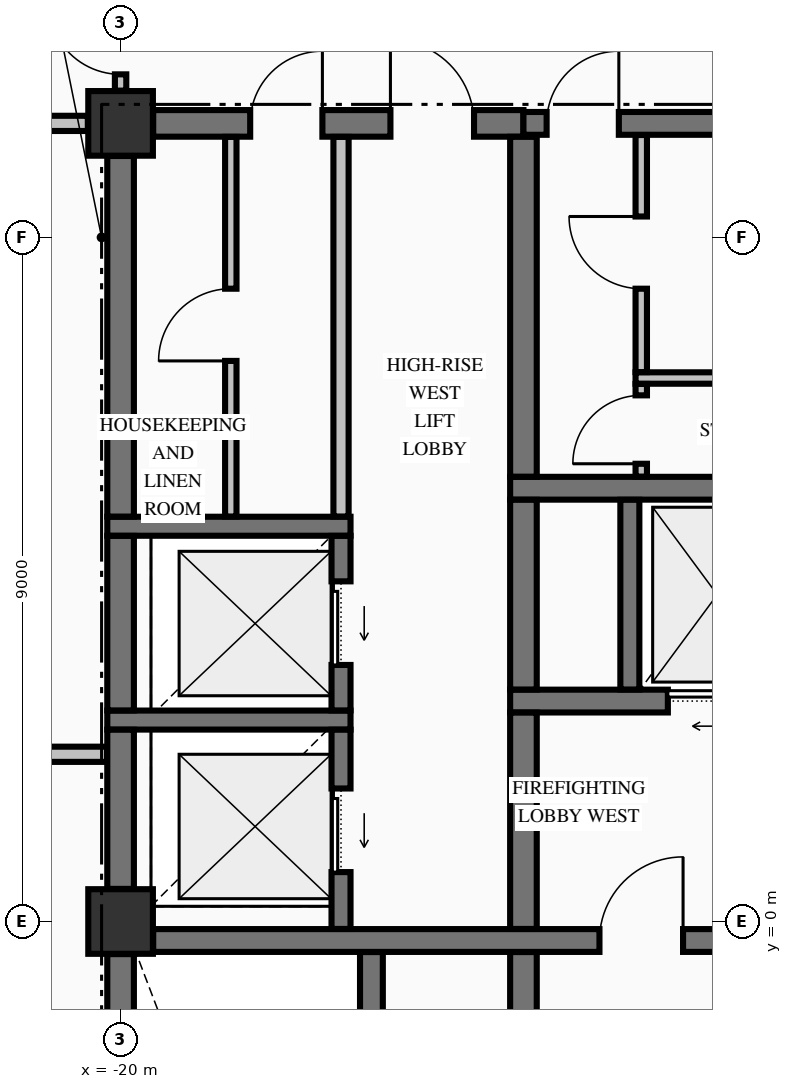
"""IFC4 building model, lengths in metres.
Left out: names, types, materials, properties, quantities, classifications, styles, units other than length and angle.
Written with IfcOpenShell. Run it as: python <this file> out.ifc"""

import sys

from ifc_helpers import new_model, si_unit, direction, frame, frame_2d, origin, origin_2d, place, context, subcontext, project, spatial, rectangle, extrude, element, fill, save


model = new_model("IFC4")
c1 = context("Model", 3, precision=1e-05, world=origin(), true_north=direction((0.0, 1.0)))
c2 = subcontext(c1, "Body", "Model", "MODEL_VIEW")
j1 = project(units=[si_unit("LENGTHUNIT", "METRE"), si_unit("PLANEANGLEUNIT", "RADIAN")], contexts=[c1])
p1 = place(None, origin())
s1 = spatial("IfcSite", under=j1, at=p1, CompositionType="ELEMENT")
p2 = place(p1, origin())
s2 = spatial("IfcBuilding", under=s1, at=p2, CompositionType="ELEMENT")
p3 = place(p2, frame((0.0, 0.0, 205.06)))
s3 = spatial("IfcBuildingStorey", under=s2, at=p3, CompositionType="ELEMENT", Elevation=205.06)
for number, where, z_axis, x_axis in (
    (1, (-20.0, 10.5, -0.25), (0.0, 0.0, 1.0), (1.0, 0.0, 0.0)),
    (2, (-20.0, 0.0, -0.25), (0.0, 0.0, 1.0), (1.0, 0.0, 0.0)),
):
    element("IfcColumn", number, at=place(p3, frame(where, z_axis=z_axis, x_axis=x_axis)), inside=s3, PredefinedType="COLUMN", context=c2, shape_type="SweptSolid", body=[
        extrude(rectangle(XDim=0.85, YDim=0.85, at=origin_2d()), origin(), (0.0, 0.0, 1.0), 3.4),
    ])
p4 = place(p3, frame((-19.571, -0.25, 0.0), z_axis=(0.0, 0.0, 1.0), x_axis=(1.0, 0.0, 0.0)))
e3 = element("IfcWall", 3, at=p4, inside=s3, PredefinedType="SHEAR", context=c2, shape_type="SweptSolid", body=[
    extrude(rectangle(XDim=8.142, YDim=0.3, at=frame_2d((4.071, 0.0))), origin(), (0.0, 0.0, 1.0), 3.15),
])
p5 = place(p4, frame((5.871, 0.0, 0.0)))
e4 = element("IfcOpeningElement", 4, at=p5, cuts=e3, PredefinedType="OPENING", context=c2, shape_type="SweptSolid", body=[
    extrude(rectangle(XDim=1.1, YDim=2.15, at=frame_2d((0.55, 1.075))), frame((0.0, 0.16, 0.0), z_axis=(0.0, -1.0, 0.0), x_axis=(1.0, 0.0, 0.0)), (0.0, 0.0, 1.0), 0.32),
])
p6 = place(p3, frame((-20.175, 2.65, 0.0), z_axis=(0.0, 0.0, 1.0), x_axis=(1.0, 0.0, 0.0)))
e5 = element("IfcWall", 5, at=p6, inside=s3, PredefinedType="SOLIDWALL", context=c2, shape_type="SweptSolid", body=[
    extrude(rectangle(XDim=3.2, YDim=0.25, at=frame_2d((1.6, 0.0))), origin(), (0.0, 0.0, 1.0), 3.15),
])
p7 = place(p3, frame((-14.875, 2.9, 0.0), z_axis=(0.0, 0.0, 1.0), x_axis=(1.0, 0.0, 0.0)))
e6 = element("IfcWall", 6, at=p7, inside=s3, PredefinedType="SHEAR", context=c2, shape_type="SweptSolid", body=[
    extrude(rectangle(XDim=4.025, YDim=0.3, at=frame_2d((2.012, 0.0))), origin(), (0.0, 0.0, 1.0), 3.15),
])
p8 = place(p7, frame((2.075, 0.0, 0.0)))
e7 = element("IfcOpeningElement", 7, at=p8, cuts=e6, PredefinedType="OPENING", context=c2, shape_type="SweptSolid", body=[
    extrude(rectangle(XDim=1.1, YDim=2.2, at=frame_2d((0.55, 1.1))), frame((0.0, 0.16, 0.0), z_axis=(0.0, -1.0, 0.0), x_axis=(1.0, 0.0, 0.0)), (0.0, 0.0, 1.0), 0.32),
])
p9 = place(p3, frame((-20.175, 5.2, 0.0), z_axis=(0.0, 0.0, 1.0), x_axis=(1.0, 0.0, 0.0)))
e8 = element("IfcWall", 8, at=p9, inside=s3, PredefinedType="SOLIDWALL", context=c2, shape_type="SweptSolid", body=[
    extrude(rectangle(XDim=3.2, YDim=0.25, at=frame_2d((1.6, 0.0))), origin(), (0.0, 0.0, 1.0), 3.15),
])
p10 = place(p3, frame((-14.875, 5.7, 0.0), z_axis=(0.0, 0.0, 1.0), x_axis=(1.0, 0.0, 0.0)))
e9 = element("IfcWall", 9, at=p10, inside=s3, PredefinedType="SHEAR", context=c2, shape_type="SweptSolid", body=[
    extrude(rectangle(XDim=4.025, YDim=0.3, at=frame_2d((2.012, 0.0))), origin(), (0.0, 0.0, 1.0), 3.15),
])
p11 = place(p3, frame((-19.571, 10.5, 0.0), z_axis=(0.0, 0.0, 1.0), x_axis=(1.0, 0.0, 0.0)))
e10 = element("IfcWall", 10, at=p11, inside=s3, PredefinedType="SHEAR", context=c2, shape_type="SweptSolid", body=[
    extrude(rectangle(XDim=4.871, YDim=0.35, at=frame_2d((2.436, 0.0))), origin(), (0.0, 0.0, 1.0), 3.15),
])
p12 = place(p11, frame((3.121, 0.0, 0.0)))
e11 = element("IfcOpeningElement", 11, at=p12, cuts=e10, PredefinedType="OPENING", context=c2, shape_type="SweptSolid", body=[
    extrude(rectangle(XDim=1.1, YDim=2.15, at=frame_2d((0.55, 1.075))), frame((0.0, 0.185, 0.0), z_axis=(0.0, -1.0, 0.0), x_axis=(1.0, 0.0, 0.0)), (0.0, 0.0, 1.0), 0.37),
])
p13 = place(p11, frame((1.276, 0.0, 0.0)))
e12 = element("IfcOpeningElement", 12, at=p13, cuts=e10, PredefinedType="OPENING", context=c2, shape_type="SweptSolid", body=[
    extrude(rectangle(XDim=0.95, YDim=2.15, at=frame_2d((0.475, 1.075))), frame((0.0, 0.185, 0.0), z_axis=(0.0, -1.0, 0.0), x_axis=(1.0, 0.0, 0.0)), (0.0, 0.0, 1.0), 0.37),
])
p14 = place(p3, frame((-14.7, 10.5, 0.0), z_axis=(0.0, 0.0, 1.0), x_axis=(1.0, 0.0, 0.0)))
e13 = element("IfcWall", 13, at=p14, inside=s3, PredefinedType="SHEAR", context=c2, shape_type="SweptSolid", body=[
    extrude(rectangle(XDim=3.271, YDim=0.3, at=frame_2d((1.635, 0.0))), origin(), (0.0, 0.0, 1.0), 3.15),
])
p15 = place(p14, frame((0.305, 0.0, 0.0)))
e14 = element("IfcOpeningElement", 14, at=p15, cuts=e13, PredefinedType="OPENING", context=c2, shape_type="SweptSolid", body=[
    extrude(rectangle(XDim=0.95, YDim=2.15, at=frame_2d((0.475, 1.075))), frame((0.0, 0.16, 0.0), z_axis=(0.0, -1.0, 0.0), x_axis=(1.0, 0.0, 0.0)), (0.0, 0.0, 1.0), 0.32),
])
p16 = place(p3, frame((-26.835, 2.2, 0.0), z_axis=(0.0, 0.0, 1.0), x_axis=(1.0, 0.0, 0.0)))
e15 = element("IfcWall", 15, at=p16, inside=s3, PredefinedType="PARTITIONING", context=c2, shape_type="SweptSolid", body=[
    extrude(rectangle(XDim=6.657, YDim=0.2, at=frame_2d((3.329, 0.0))), origin(), (0.0, 0.0, 1.0), 3.15),
])
p17 = place(p3, frame((-13.225, 7.15, 0.0), z_axis=(0.0, 0.0, 1.0), x_axis=(1.0, 0.0, 0.0)))
e16 = element("IfcWall", 16, at=p17, inside=s3, PredefinedType="PARTITIONING", context=c2, shape_type="SweptSolid", body=[
    extrude(rectangle(XDim=2.072, YDim=0.15, at=frame_2d((1.036, 0.0))), origin(), (0.0, 0.0, 1.0), 3.15),
])
p18 = place(p3, frame((-26.835, 10.5, 0.0), z_axis=(0.0, 0.0, 1.0), x_axis=(1.0, 0.0, 0.0)))
e17 = element("IfcWall", 17, at=p18, inside=s3, PredefinedType="PARTITIONING", context=c2, shape_type="SweptSolid", body=[
    extrude(rectangle(XDim=6.404, YDim=0.2, at=frame_2d((3.202, 0.0))), origin(), (0.0, 0.0, 1.0), 3.15),
])
p19 = place(p18, frame((2.86, 0.0, 0.0)))
e18 = element("IfcOpeningElement", 18, at=p19, cuts=e17, PredefinedType="OPENING", context=c2, shape_type="SweptSolid", body=[
    extrude(rectangle(XDim=0.95, YDim=2.15, at=frame_2d((0.475, 1.075))), frame((0.0, 0.11, 0.0), z_axis=(0.0, -1.0, 0.0), x_axis=(1.0, 0.0, 0.0)), (0.0, 0.0, 1.0), 0.22),
])
p20 = place(p3, frame((-20.0, -9.521, 0.0), z_axis=(0.0, 0.0, 1.0), x_axis=(0.0, 1.0, 0.0)))
e19 = element("IfcWall", 19, at=p20, inside=s3, PredefinedType="SHEAR", context=c2, shape_type="SweptSolid", body=[
    extrude(rectangle(XDim=9.092, YDim=0.35, at=frame_2d((4.546, 0.0))), origin(), (0.0, 0.0, 1.0), 3.15),
])
p21 = place(p3, frame((-20.0, 0.429, 0.0), z_axis=(0.0, 0.0, 1.0), x_axis=(0.0, 1.0, 0.0)))
e20 = element("IfcWall", 20, at=p21, inside=s3, PredefinedType="SHEAR", context=c2, shape_type="SweptSolid", body=[
    extrude(rectangle(XDim=2.094, YDim=0.35, at=frame_2d((1.047, 0.0))), origin(), (0.0, 0.0, 1.0), 3.15),
])
p22 = place(p3, frame((-20.0, 2.777, 0.0), z_axis=(0.0, 0.0, 1.0), x_axis=(0.0, 1.0, 0.0)))
e21 = element("IfcWall", 21, at=p22, inside=s3, PredefinedType="SHEAR", context=c2, shape_type="SweptSolid", body=[
    extrude(rectangle(XDim=2.296, YDim=0.35, at=frame_2d((1.148, 0.0))), origin(), (0.0, 0.0, 1.0), 3.15),
])
p23 = place(p3, frame((-20.0, 5.327, 0.0), z_axis=(0.0, 0.0, 1.0), x_axis=(0.0, 1.0, 0.0)))
e22 = element("IfcWall", 22, at=p23, inside=s3, PredefinedType="SHEAR", context=c2, shape_type="SweptSolid", body=[
    extrude(rectangle(XDim=4.744, YDim=0.35, at=frame_2d((2.372, 0.0))), origin(), (0.0, 0.0, 1.0), 3.15),
])
p24 = place(p3, frame((-17.1, -0.098, 0.0), z_axis=(0.0, 0.0, 1.0), x_axis=(0.0, 1.0, 0.0)))
e23 = element("IfcWall", 23, at=p24, inside=s3, PredefinedType="SOLIDWALL", context=c2, shape_type="SweptSolid", body=[
    extrude(rectangle(XDim=2.621, YDim=0.25, at=frame_2d((1.311, 0.0))), origin(), (0.0, 0.0, 1.0), 3.15),
])
p25 = place(p24, frame((0.748, 0.0, 0.0)))
e24 = element("IfcOpeningElement", 24, at=p25, cuts=e23, PredefinedType="OPENING", context=c2, shape_type="SweptSolid", body=[
    extrude(rectangle(XDim=1.1, YDim=2.2, at=frame_2d((0.55, 1.1))), frame((0.0, 0.135, 0.0), z_axis=(0.0, -1.0, 0.0), x_axis=(1.0, 0.0, 0.0)), (0.0, 0.0, 1.0), 0.27),
])
p26 = place(p3, frame((-17.1, 2.777, 0.0), z_axis=(0.0, 0.0, 1.0), x_axis=(0.0, 1.0, 0.0)))
e25 = element("IfcWall", 25, at=p26, inside=s3, PredefinedType="SOLIDWALL", context=c2, shape_type="SweptSolid", body=[
    extrude(rectangle(XDim=2.296, YDim=0.25, at=frame_2d((1.148, 0.0))), origin(), (0.0, 0.0, 1.0), 3.15),
])
p27 = place(p26, frame((0.598, 0.0, 0.0)))
e26 = element("IfcOpeningElement", 26, at=p27, cuts=e25, PredefinedType="OPENING", context=c2, shape_type="SweptSolid", body=[
    extrude(rectangle(XDim=1.1, YDim=2.2, at=frame_2d((0.55, 1.1))), frame((0.0, 0.135, 0.0), z_axis=(0.0, -1.0, 0.0), x_axis=(1.0, 0.0, 0.0)), (0.0, 0.0, 1.0), 0.27),
])
p28 = place(p3, frame((-16.7, -9.773, 0.0), z_axis=(0.0, 0.0, 1.0), x_axis=(0.0, 1.0, 0.0)))
e27 = element("IfcWall", 27, at=p28, inside=s3, PredefinedType="SHEAR", context=c2, shape_type="SweptSolid", body=[
    extrude(rectangle(XDim=9.371, YDim=0.3, at=frame_2d((4.686, 0.0))), origin(), (0.0, 0.0, 1.0), 3.15),
])
p29 = place(p3, frame((-14.7, -9.773, 0.0), z_axis=(0.0, 0.0, 1.0), x_axis=(0.0, 1.0, 0.0)))
e28 = element("IfcWall", 28, at=p29, inside=s3, PredefinedType="SHEAR", context=c2, shape_type="SweptSolid", body=[
    extrude(rectangle(XDim=9.371, YDim=0.35, at=frame_2d((4.686, 0.0))), origin(), (0.0, 0.0, 1.0), 3.15),
])
p30 = place(p3, frame((-14.7, -0.098, 0.0), z_axis=(0.0, 0.0, 1.0), x_axis=(0.0, 1.0, 0.0)))
e29 = element("IfcWall", 29, at=p30, inside=s3, PredefinedType="SHEAR", context=c2, shape_type="SweptSolid", body=[
    extrude(rectangle(XDim=2.846, YDim=0.35, at=frame_2d((1.423, 0.0))), origin(), (0.0, 0.0, 1.0), 3.15),
])
p31 = place(p3, frame((-14.7, 3.052, 0.0), z_axis=(0.0, 0.0, 1.0), x_axis=(0.0, 1.0, 0.0)))
e30 = element("IfcWall", 30, at=p31, inside=s3, PredefinedType="SHEAR", context=c2, shape_type="SweptSolid", body=[
    extrude(rectangle(XDim=2.496, YDim=0.35, at=frame_2d((1.248, 0.0))), origin(), (0.0, 0.0, 1.0), 3.15),
])
p32 = place(p3, frame((-14.7, 5.852, 0.0), z_axis=(0.0, 0.0, 1.0), x_axis=(0.0, 1.0, 0.0)))
e31 = element("IfcWall", 31, at=p32, inside=s3, PredefinedType="SHEAR", context=c2, shape_type="SweptSolid", body=[
    extrude(rectangle(XDim=4.471, YDim=0.35, at=frame_2d((2.235, 0.0))), origin(), (0.0, 0.0, 1.0), 3.15),
])
p33 = place(p3, frame((-13.3, 3.052, 0.0), z_axis=(0.0, 0.0, 1.0), x_axis=(0.0, 1.0, 0.0)))
e32 = element("IfcWall", 32, at=p33, inside=s3, PredefinedType="SOLIDWALL", context=c2, shape_type="SweptSolid", body=[
    extrude(rectangle(XDim=2.496, YDim=0.25, at=frame_2d((1.248, 0.0))), origin(), (0.0, 0.0, 1.0), 3.15),
])
p34 = place(p3, frame((-20.0, 10.931, 0.0), z_axis=(0.0, 0.0, 1.0), x_axis=(0.0, 1.0, 0.0)))
e33 = element("IfcWall", 33, at=p34, inside=s3, PredefinedType="PARTITIONING", context=c2, shape_type="SweptSolid", body=[
    extrude(rectangle(XDim=1.716, YDim=0.15, at=frame_2d((0.858, 0.0))), origin(), (0.0, 0.0, 1.0), 2.342),
])
p35 = place(p34, frame((0.214, 0.0, 0.0)))
e34 = element("IfcOpeningElement", 34, at=p35, cuts=e33, PredefinedType="OPENING", context=c2, shape_type="SweptSolid", body=[
    extrude(rectangle(XDim=0.95, YDim=2.15, at=frame_2d((0.475, 1.075))), frame((0.0, 0.085, 0.0), z_axis=(0.0, -1.0, 0.0), x_axis=(1.0, 0.0, 0.0)), (0.0, 0.0, 1.0), 0.17),
])
p36 = place(p3, frame((-18.55, 5.328, 0.0), z_axis=(0.0, 0.0, 1.0), x_axis=(0.0, 1.0, 0.0)))
e35 = element("IfcWall", 35, at=p36, inside=s3, PredefinedType="PARTITIONING", context=c2, shape_type="SweptSolid", body=[
    extrude(rectangle(XDim=4.994, YDim=0.15, at=frame_2d((2.497, 0.0))), origin(), (0.0, 0.0, 1.0), 3.15),
])
p37 = place(p36, frame((2.047, 0.0, 0.0)))
e36 = element("IfcOpeningElement", 36, at=p37, cuts=e35, PredefinedType="OPENING", context=c2, shape_type="SweptSolid", body=[
    extrude(rectangle(XDim=0.95, YDim=2.15, at=frame_2d((0.475, 1.075))), frame((0.0, 0.085, 0.0), z_axis=(0.0, -1.0, 0.0), x_axis=(1.0, 0.0, 0.0)), (0.0, 0.0, 1.0), 0.17),
])
p38 = place(p3, frame((-17.1, 5.328, 0.0), z_axis=(0.0, 0.0, 1.0), x_axis=(0.0, 1.0, 0.0)))
e37 = element("IfcWall", 37, at=p38, inside=s3, PredefinedType="PARTITIONING", context=c2, shape_type="SweptSolid", body=[
    extrude(rectangle(XDim=4.994, YDim=0.2, at=frame_2d((2.497, 0.0))), origin(), (0.0, 0.0, 1.0), 3.15),
])
p39 = place(p3, frame((-13.15, 5.853, 0.0), z_axis=(0.0, 0.0, 1.0), x_axis=(0.0, 1.0, 0.0)))
e38 = element("IfcWall", 38, at=p39, inside=s3, PredefinedType="PARTITIONING", context=c2, shape_type="SweptSolid", body=[
    extrude(rectangle(XDim=1.219, YDim=0.15, at=frame_2d((0.609, 0.0))), origin(), (0.0, 0.0, 1.0), 3.15),
])
p40 = place(p39, frame((0.169, 0.0, 0.0)))
e39 = element("IfcOpeningElement", 39, at=p40, cuts=e38, PredefinedType="OPENING", context=c2, shape_type="SweptSolid", body=[
    extrude(rectangle(XDim=0.9, YDim=2.15, at=frame_2d((0.45, 1.075))), frame((0.0, 0.085, 0.0), z_axis=(0.0, -1.0, 0.0), x_axis=(1.0, 0.0, 0.0)), (0.0, 0.0, 1.0), 0.17),
])
p41 = place(p3, frame((-13.15, 7.228, 0.0), z_axis=(0.0, 0.0, 1.0), x_axis=(0.0, 1.0, 0.0)))
e40 = element("IfcWall", 40, at=p41, inside=s3, PredefinedType="PARTITIONING", context=c2, shape_type="SweptSolid", body=[
    extrude(rectangle(XDim=3.119, YDim=0.15, at=frame_2d((1.56, 0.0))), origin(), (0.0, 0.0, 1.0), 3.15),
])
p42 = place(p41, frame((1.097, 0.0, 0.0)))
e41 = element("IfcOpeningElement", 41, at=p42, cuts=e40, PredefinedType="OPENING", context=c2, shape_type="SweptSolid", body=[
    extrude(rectangle(XDim=0.95, YDim=2.15, at=frame_2d((0.475, 1.075))), frame((0.0, 0.085, 0.0), z_axis=(0.0, -1.0, 0.0), x_axis=(1.0, 0.0, 0.0)), (0.0, 0.0, 1.0), 0.17),
])
p43 = place(p5, origin())
e42 = element("IfcDoor", 42, at=p43, inside=s3, OperationType="SINGLE_SWING_RIGHT", PredefinedType="DOOR", context=c2, shape_type="SweptSolid", body=[
    extrude(rectangle(XDim=1.1, YDim=2.15, at=frame_2d((0.55, 1.075))), frame((0.0, 0.025, 0.0), z_axis=(0.0, -1.0, 0.0), x_axis=(1.0, 0.0, 0.0)), (0.0, 0.0, 1.0), 0.05),
])
fill(e4, e42)
p44 = place(p8, origin())
e43 = element("IfcDoor", 43, at=p44, inside=s3, OperationType="SLIDING_TO_LEFT", PredefinedType="DOOR", context=c2, shape_type="SweptSolid", body=[
    extrude(rectangle(XDim=1.1, YDim=2.2, at=frame_2d((0.55, 1.1))), frame((0.0, 0.025, 0.0), z_axis=(0.0, -1.0, 0.0), x_axis=(1.0, 0.0, 0.0)), (0.0, 0.0, 1.0), 0.05),
])
fill(e7, e43)
p45 = place(p15, origin())
e44 = element("IfcDoor", 44, at=p45, inside=s3, OperationType="SINGLE_SWING_RIGHT", PredefinedType="DOOR", context=c2, shape_type="SweptSolid", body=[
    extrude(rectangle(XDim=0.95, YDim=2.15, at=frame_2d((0.475, 1.075))), frame((0.0, 0.025, 0.0), z_axis=(0.0, -1.0, 0.0), x_axis=(1.0, 0.0, 0.0)), (0.0, 0.0, 1.0), 0.05),
])
fill(e14, e44)
p46 = place(p40, origin())
e45 = element("IfcDoor", 45, at=p46, inside=s3, OperationType="SINGLE_SWING_LEFT", PredefinedType="DOOR", context=c2, shape_type="SweptSolid", body=[
    extrude(rectangle(XDim=0.9, YDim=2.15, at=frame_2d((0.45, 1.075))), frame((0.0, 0.025, 0.0), z_axis=(0.0, -1.0, 0.0), x_axis=(1.0, 0.0, 0.0)), (0.0, 0.0, 1.0), 0.05),
])
fill(e39, e45)
p47 = place(p42, origin())
e46 = element("IfcDoor", 46, at=p47, inside=s3, OperationType="SINGLE_SWING_RIGHT", PredefinedType="DOOR", context=c2, shape_type="SweptSolid", body=[
    extrude(rectangle(XDim=0.95, YDim=2.15, at=frame_2d((0.475, 1.075))), frame((0.0, 0.025, 0.0), z_axis=(0.0, -1.0, 0.0), x_axis=(1.0, 0.0, 0.0)), (0.0, 0.0, 1.0), 0.05),
])
fill(e41, e46)
p48 = place(p25, origin())
e47 = element("IfcDoor", 47, at=p48, inside=s3, OperationType="SLIDING_TO_LEFT", PredefinedType="DOOR", context=c2, shape_type="SweptSolid", body=[
    extrude(rectangle(XDim=1.1, YDim=2.2, at=frame_2d((0.55, 1.1))), frame((0.0, 0.025, 0.0), z_axis=(0.0, -1.0, 0.0), x_axis=(1.0, 0.0, 0.0)), (0.0, 0.0, 1.0), 0.05),
])
fill(e24, e47)
p49 = place(p27, origin())
e48 = element("IfcDoor", 48, at=p49, inside=s3, OperationType="SLIDING_TO_LEFT", PredefinedType="DOOR", context=c2, shape_type="SweptSolid", body=[
    extrude(rectangle(XDim=1.1, YDim=2.2, at=frame_2d((0.55, 1.1))), frame((0.0, 0.025, 0.0), z_axis=(0.0, -1.0, 0.0), x_axis=(1.0, 0.0, 0.0)), (0.0, 0.0, 1.0), 0.05),
])
fill(e26, e48)
p50 = place(p12, origin())
e49 = element("IfcDoor", 49, at=p50, inside=s3, OperationType="SINGLE_SWING_LEFT", PredefinedType="DOOR", context=c2, shape_type="SweptSolid", body=[
    extrude(rectangle(XDim=1.1, YDim=2.15, at=frame_2d((0.55, 1.075))), frame((0.0, 0.025, 0.0), z_axis=(0.0, -1.0, 0.0), x_axis=(1.0, 0.0, 0.0)), (0.0, 0.0, 1.0), 0.05),
])
fill(e11, e49)
p51 = place(p13, origin())
e50 = element("IfcDoor", 50, at=p51, inside=s3, OperationType="SINGLE_SWING_RIGHT", PredefinedType="DOOR", context=c2, shape_type="SweptSolid", body=[
    extrude(rectangle(XDim=0.95, YDim=2.15, at=frame_2d((0.475, 1.075))), frame((0.0, 0.025, 0.0), z_axis=(0.0, -1.0, 0.0), x_axis=(1.0, 0.0, 0.0)), (0.0, 0.0, 1.0), 0.05),
])
fill(e12, e50)
p52 = place(p37, origin())
e51 = element("IfcDoor", 51, at=p52, inside=s3, OperationType="SINGLE_SWING_LEFT", PredefinedType="DOOR", context=c2, shape_type="SweptSolid", body=[
    extrude(rectangle(XDim=0.95, YDim=2.15, at=frame_2d((0.475, 1.075))), frame((0.0, 0.025, 0.0), z_axis=(0.0, -1.0, 0.0), x_axis=(1.0, 0.0, 0.0)), (0.0, 0.0, 1.0), 0.05),
])
fill(e36, e51)
p53 = place(p35, origin())
e52 = element("IfcDoor", 52, at=p53, inside=s3, OperationType="SINGLE_SWING_RIGHT", PredefinedType="DOOR", context=c2, shape_type="SweptSolid", body=[
    extrude(rectangle(XDim=0.95, YDim=2.15, at=frame_2d((0.475, 1.075))), frame((0.0, 0.025, 0.0), z_axis=(0.0, -1.0, 0.0), x_axis=(1.0, 0.0, 0.0)), (0.0, 0.0, 1.0), 0.05),
])
fill(e34, e52)
save(model, sys.argv[1])
